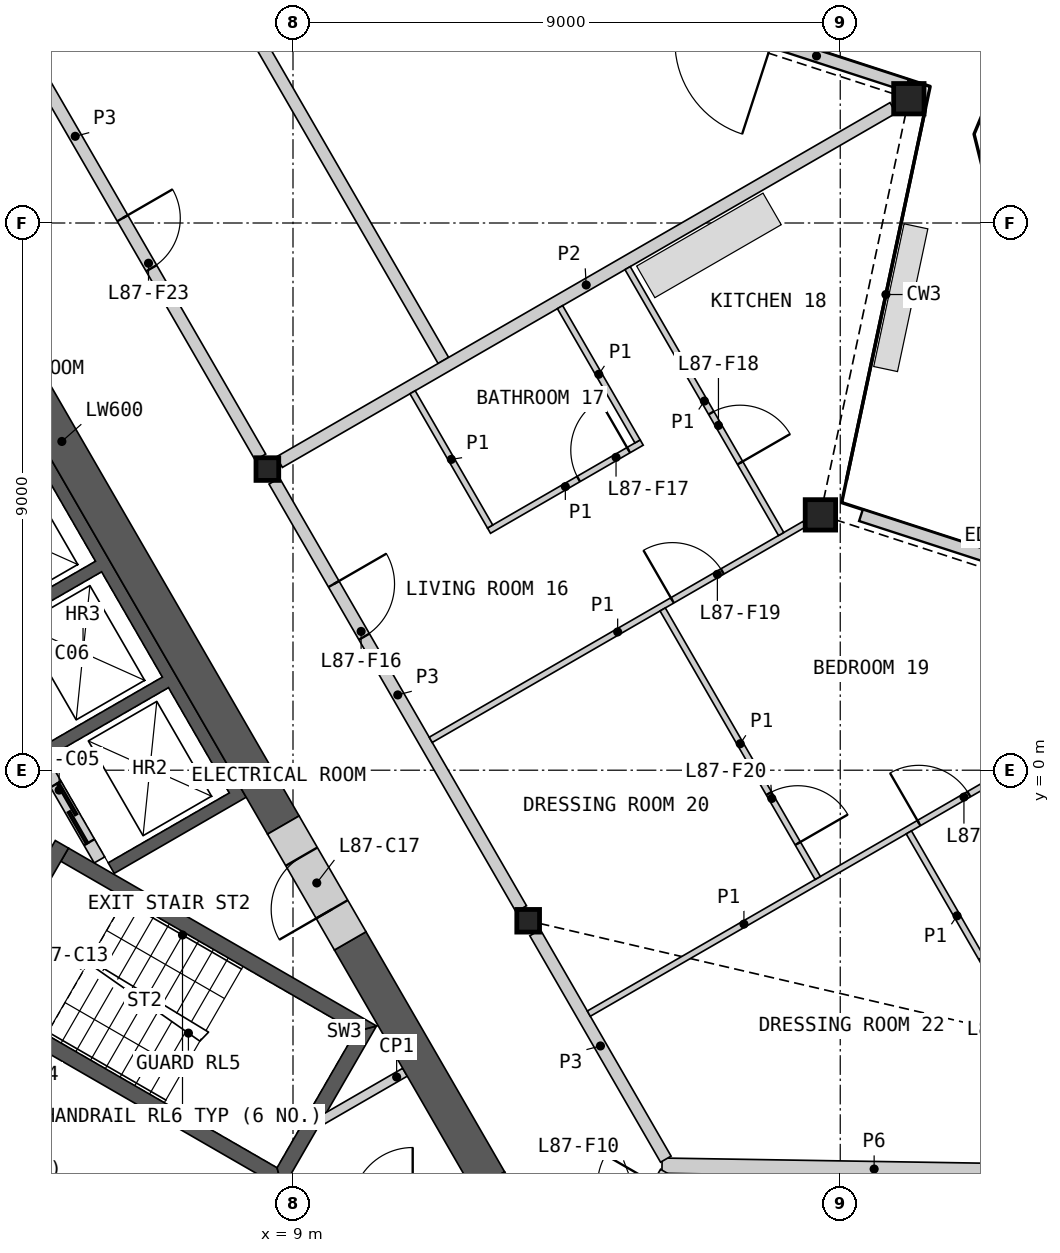
"""IFC4 building model, lengths in metres.
Left out: names, types, materials, properties, quantities, classifications, styles, units other than length and angle.
Written with IfcOpenShell. Run it as: python <this file> out.ifc"""

import sys

from ifc_helpers import new_model, si_unit, direction, frame, frame_2d, origin, origin_2d, place, context, subcontext, project, spatial, polyline, rectangle, hollow_rectangle, i_section, outline, extrude, element, fill, save


model = new_model("IFC4")
c1 = context("Model", 3, precision=1e-05, world=origin(), true_north=direction((0.0, 1.0)))
c2 = subcontext(c1, "Body", "Model", "MODEL_VIEW")
j1 = project(units=[si_unit("LENGTHUNIT", "METRE"), si_unit("PLANEANGLEUNIT", "RADIAN")], contexts=[c1])
p1 = place(None, origin())
s1 = spatial("IfcSite", under=j1, at=p1, CompositionType="ELEMENT")
p2 = place(p1, origin())
s2 = spatial("IfcBuilding", under=s1, at=p2, CompositionType="ELEMENT")
p3 = place(p2, frame((0.0, 0.0, 384.8)))
s3 = spatial("IfcBuildingStorey", under=s2, at=p3, CompositionType="ELEMENT", Elevation=384.8)
for number, where, z_axis, x_axis in (
    (1, (17.674, 4.199, 0.0), (0.0, 0.0, 1.0), (1.0, 0.0, 0.0)),
    (2, (19.129, 11.044, 0.0), (0.0, 0.0, 1.0), (1.0, 0.0, 0.0)),
):
    element("IfcColumn", number, at=place(p3, frame(where, z_axis=z_axis, x_axis=x_axis)), inside=s3, PredefinedType="COLUMN", context=c2, shape_type="SweptSolid", body=[
        extrude(hollow_rectangle(XDim=0.5, YDim=0.5, WallThickness=0.03, at=origin_2d()), origin(), (0.0, 0.0, 1.0), 3.4),
    ])
for number, where, z_axis, x_axis in (
    (3, (12.868, -2.476, 0.0), (0.0, 0.0, 1.0), (1.0, 0.0, 0.0)),
    (4, (8.578, 4.953, 0.0), (0.0, 0.0, 1.0), (1.0, 0.0, 0.0)),
):
    element("IfcColumn", number, at=place(p3, frame(where, z_axis=z_axis, x_axis=x_axis)), inside=s3, PredefinedType="COLUMN", context=c2, shape_type="SweptSolid", body=[
        extrude(i_section(OverallWidth=0.374, OverallDepth=0.372, WebThickness=0.016, FlangeThickness=0.026, at=origin_2d()), origin(), (0.0, 0.0, 1.0), 3.4),
    ])
p4 = place(p3, frame((24.3, 2.257, 0.0), z_axis=(0.0, 0.0, 1.0), x_axis=(-0.951060123915, 0.309005891041, 0.0)))
e5 = element("IfcWall", 5, at=p4, inside=s3, PredefinedType="SOLIDWALL", context=c2, shape_type="SweptSolid", body=[
    extrude(rectangle(XDim=6.265, YDim=0.2, at=frame_2d((3.133, 0.0))), origin(), (0.0, 0.0, 1.0), 2.634),
])
p5 = place(p4, frame((2.333, 0.0, 0.0)))
e6 = element("IfcOpeningElement", 6, at=p5, cuts=e5, PredefinedType="OPENING", context=c2, shape_type="SweptSolid", body=[
    extrude(rectangle(XDim=1.6, YDim=2.25, at=frame_2d((0.8, 1.125))), frame((0.0, 0.11, 0.0), z_axis=(0.0, -1.0, 0.0), x_axis=(1.0, 0.0, 0.0)), (0.0, 0.0, 1.0), 0.22),
])
p6 = place(p3, frame((19.099, 11.264, 0.0), z_axis=(0.0, 0.0, 1.0), x_axis=(-0.951056402988, 0.3090173431, 0.0)))
e7 = element("IfcWall", 7, at=p6, inside=s3, PredefinedType="SOLIDWALL", context=c2, shape_type="SweptSolid", body=[
    extrude(rectangle(XDim=6.265, YDim=0.2, at=frame_2d((3.133, 0.0))), origin(), (0.0, 0.0, 1.0), 2.634),
])
p7 = place(p6, frame((2.333, 0.0, 0.0)))
e8 = element("IfcOpeningElement", 8, at=p7, cuts=e7, PredefinedType="OPENING", context=c2, shape_type="SweptSolid", body=[
    extrude(rectangle(XDim=1.6, YDim=2.25, at=frame_2d((0.8, 1.125))), frame((0.0, 0.11, 0.0), z_axis=(0.0, -1.0, 0.0), x_axis=(1.0, 0.0, 0.0)), (0.0, 0.0, 1.0), 0.22),
])
p8 = place(p3, origin())
e9 = element("IfcWall", 9, at=p8, inside=s3, PredefinedType="SHEAR", context=c2, shape_type="SweptSolid", body=[
    extrude(outline(polyline([(1.561, 6.097), (3.731, 7.35), (8.231, -0.444), (6.061, -1.697), (5.96, -1.524), (7.952, -0.374), (6.952, 1.358), (4.96, 0.208), (4.861, 0.381), (6.852, 1.531), (5.852, 3.263), (3.861, 2.113), (3.76, 2.287), (5.752, 3.437), (4.752, 5.169), (2.76, 4.019), (2.66, 4.192), (4.652, 5.342), (3.652, 7.074), (1.66, 5.924), (1.561, 6.097)])), origin(), (0.0, 0.0, 1.0), 3.1),
])
p9 = place(p3, frame((5.817, -1.476, 0.0), z_axis=(0.0, 0.0, 1.0), x_axis=(-0.500002616675, 0.866023893041, 0.0)))
e10 = element("IfcWall", 10, at=p9, inside=s3, PredefinedType="SOLIDWALL", context=c2, shape_type="SweptSolid", body=[
    extrude(rectangle(XDim=8.373, YDim=0.2, at=frame_2d((4.187, 0.0))), origin(), (0.0, 0.0, 1.0), 3.1),
])
p10 = place(p9, frame((0.337, 0.0, 0.0)))
e11 = element("IfcOpeningElement", 11, at=p10, cuts=e10, PredefinedType="OPENING", context=c2, shape_type="SweptSolid", body=[
    extrude(rectangle(XDim=1.1, YDim=2.1, at=frame_2d((0.55, 1.05))), frame((0.0, 0.11, 0.0), z_axis=(0.0, -1.0, 0.0), x_axis=(1.0, 0.0, 0.0)), (0.0, 0.0, 1.0), 0.22),
])
p11 = place(p9, frame((2.537, 0.0, 0.0)))
e12 = element("IfcOpeningElement", 12, at=p11, cuts=e10, PredefinedType="OPENING", context=c2, shape_type="SweptSolid", body=[
    extrude(rectangle(XDim=1.1, YDim=2.1, at=frame_2d((0.55, 1.05))), frame((0.0, 0.11, 0.0), z_axis=(0.0, -1.0, 0.0), x_axis=(1.0, 0.0, 0.0)), (0.0, 0.0, 1.0), 0.22),
])
p12 = place(p9, frame((4.737, 0.0, 0.0)))
e13 = element("IfcOpeningElement", 13, at=p12, cuts=e10, PredefinedType="OPENING", context=c2, shape_type="SweptSolid", body=[
    extrude(rectangle(XDim=1.1, YDim=2.1, at=frame_2d((0.55, 1.05))), frame((0.0, 0.11, 0.0), z_axis=(0.0, -1.0, 0.0), x_axis=(1.0, 0.0, 0.0)), (0.0, 0.0, 1.0), 0.22),
])
p13 = place(p9, frame((7.037, 0.0, 0.0)))
e14 = element("IfcOpeningElement", 14, at=p13, cuts=e10, PredefinedType="OPENING", context=c2, shape_type="SweptSolid", body=[
    extrude(rectangle(XDim=0.9, YDim=2.1, at=frame_2d((0.45, 1.05))), frame((0.0, 0.11, 0.0), z_axis=(0.0, -1.0, 0.0), x_axis=(1.0, 0.0, 0.0)), (0.0, 0.0, 1.0), 0.22),
])
p14 = place(p3, origin())
e15 = element("IfcWall", 15, at=p14, inside=s3, PredefinedType="SHEAR", context=c2, shape_type="SweptSolid", body=[
    extrude(outline(polyline([(3.763, -3.956), (8.83, -6.881), (8.738, -6.539), (3.888, -3.739), (3.763, -3.956)])), origin(), (0.0, 0.0, 1.0), 3.1),
])
p15 = place(p3, origin())
e16 = element("IfcWall", 16, at=p15, inside=s3, PredefinedType="SHEAR", context=c2, shape_type="SweptSolid", body=[
    extrude(outline(polyline([(8.83, -6.881), (10.374, -4.206), (10.032, -4.298), (8.738, -6.539), (8.83, -6.881)])), origin(), (0.0, 0.0, 1.0), 3.1),
])
p16 = place(p3, origin())
e17 = element("IfcWall", 17, at=p16, inside=s3, PredefinedType="SHEAR", context=c2, shape_type="SweptSolid", body=[
    extrude(outline(polyline([(10.032, -4.298), (10.374, -4.206), (5.307, -1.281), (5.182, -1.498), (10.032, -4.298)])), origin(), (0.0, 0.0, 1.0), 3.1),
])
p17 = place(p3, frame((3.655, -3.893, 0.0), z_axis=(0.0, 0.0, 1.0), x_axis=(0.499982516597, 0.866035497597, 0.0)))
e18 = element("IfcWall", 18, at=p17, inside=s3, PredefinedType="SHEAR", context=c2, shape_type="SweptSolid", body=[
    extrude(rectangle(XDim=3.088, YDim=0.25, at=frame_2d((1.544, 0.0))), origin(), (0.0, 0.0, 1.0), 3.1),
])
p18 = place(p17, frame((0.994, 0.0, 0.0)))
e19 = element("IfcOpeningElement", 19, at=p18, cuts=e18, PredefinedType="OPENING", context=c2, shape_type="SweptSolid", body=[
    extrude(rectangle(XDim=1.1, YDim=2.1, at=frame_2d((0.55, 1.05))), frame((0.0, 0.135, 0.0), z_axis=(0.0, -1.0, 0.0), x_axis=(1.0, 0.0, 0.0)), (0.0, 0.0, 1.0), 0.27),
])
p19 = place(p3, frame((10.842, -4.967, 0.0), z_axis=(0.0, 0.0, 1.0), x_axis=(-0.866098216386, -0.499873863663, 0.0)))
e20 = element("IfcWall", 20, at=p19, inside=s3, PredefinedType="PARTITIONING", context=c2, shape_type="SweptSolid", body=[
    extrude(rectangle(XDim=1.582, YDim=0.15, at=frame_2d((0.791, 0.0))), origin(), (0.0, 0.0, 1.0), 3.1),
])
p20 = place(p3, frame((8.841, -0.902, 0.0), z_axis=(0.0, 0.0, 1.0), x_axis=(-0.499995618375, 0.866027933502, 0.0)))
e21 = element("IfcWall", 21, at=p20, inside=s3, PredefinedType="SHEAR", context=c2, shape_type="SweptSolid", body=[
    extrude(rectangle(XDim=14.571, YDim=0.6, at=frame_2d((7.285, 0.0))), origin(), (0.0, 0.0, 1.0), 3.1),
])
p21 = place(p3, frame((12.221, -6.756, 0.0), z_axis=(0.0, 0.0, 1.0), x_axis=(-0.500020646047, 0.866013483456, 0.0)))
e22 = element("IfcWall", 22, at=p21, inside=s3, PredefinedType="SHEAR", context=c2, shape_type="SweptSolid", body=[
    extrude(rectangle(XDim=4.559, YDim=0.6, at=frame_2d((2.28, 0.0))), origin(), (0.0, 0.0, 1.0), 3.1),
])
p22 = place(p3, origin())
e23 = element("IfcWall", 23, at=p22, inside=s3, PredefinedType="SHEAR", context=c2, shape_type="SweptSolid", body=[
    extrude(outline(polyline([(11.961, -7.506), (11.961, -6.906), (12.48, -6.606), (13.0, -7.506), (11.961, -7.506)])), origin(), (0.0, 0.0, 1.0), 3.1),
])
p23 = place(p3, frame((9.941, -2.807, 0.0), z_axis=(0.0, 0.0, 1.0), x_axis=(-0.499994660107, 0.866028486751, 0.0)))
e24 = element("IfcWall", 24, at=p23, inside=s3, PredefinedType="SHEAR", context=c2, shape_type="SweptSolid", body=[
    extrude(rectangle(XDim=2.2, YDim=0.6, at=frame_2d((1.1, 0.0))), origin(), (0.0, 0.0, 1.0), 3.1),
])
p24 = place(p23, frame((0.6, 0.0, 0.0)))
e25 = element("IfcOpeningElement", 25, at=p24, cuts=e24, PredefinedType="OPENING", context=c2, shape_type="SweptSolid", body=[
    extrude(rectangle(XDim=1.0, YDim=2.1, at=frame_2d((0.5, 1.05))), frame((0.0, 0.31, 0.0), z_axis=(0.0, -1.0, 0.0), x_axis=(1.0, 0.0, 0.0)), (0.0, 0.0, 1.0), 0.62),
])
p25 = place(p3, frame((15.069, -6.503, 0.0), z_axis=(0.0, 0.0, 1.0), x_axis=(0.999870484296, -0.016093931549, 0.0)))
e26 = element("IfcWall", 26, at=p25, inside=s3, PredefinedType="PARTITIONING", context=c2, shape_type="SweptSolid", body=[
    extrude(rectangle(XDim=13.956, YDim=0.25, at=frame_2d((6.978, 0.0))), origin(), (0.0, 0.0, 1.0), 2.33),
])
p26 = place(p3, frame((4.403, 12.185, 0.0), z_axis=(0.0, 0.0, 1.0), x_axis=(0.499992155518, -0.866029932751, 0.0)))
e27 = element("IfcWall", 27, at=p26, inside=s3, PredefinedType="PARTITIONING", context=c2, shape_type="SweptSolid", body=[
    extrude(rectangle(XDim=8.123, YDim=0.2, at=frame_2d((4.062, 0.0))), origin(), (0.0, 0.0, 1.0), 3.1),
])
p27 = place(p26, frame((3.587, 0.0, 0.0)))
e28 = element("IfcOpeningElement", 28, at=p27, cuts=e27, PredefinedType="OPENING", context=c2, shape_type="SweptSolid", body=[
    extrude(rectangle(XDim=0.95, YDim=2.1, at=frame_2d((0.475, 1.05))), frame((0.0, 0.11, 0.0), z_axis=(0.0, -1.0, 0.0), x_axis=(1.0, 0.0, 0.0)), (0.0, 0.0, 1.0), 0.22),
])
p28 = place(p3, frame((8.692, 4.756, 0.0), z_axis=(0.0, 0.0, 1.0), x_axis=(0.500001682468, -0.866024432409, 0.0)))
e29 = element("IfcWall", 29, at=p28, inside=s3, PredefinedType="PARTITIONING", context=c2, shape_type="SweptSolid", body=[
    extrude(rectangle(XDim=8.124, YDim=0.2, at=frame_2d((4.062, 0.0))), origin(), (0.0, 0.0, 1.0), 3.1),
])
p29 = place(p28, frame((1.956, 0.0, 0.0)))
e30 = element("IfcOpeningElement", 30, at=p29, cuts=e29, PredefinedType="OPENING", context=c2, shape_type="SweptSolid", body=[
    extrude(rectangle(XDim=1.0, YDim=2.1, at=frame_2d((0.5, 1.05))), frame((0.0, 0.11, 0.0), z_axis=(0.0, -1.0, 0.0), x_axis=(1.0, 0.0, 0.0)), (0.0, 0.0, 1.0), 0.22),
])
p30 = place(p3, frame((12.981, -2.673, 0.0), z_axis=(0.0, 0.0, 1.0), x_axis=(0.499986217557, -0.866033360935, 0.0)))
e31 = element("IfcWall", 31, at=p30, inside=s3, PredefinedType="PARTITIONING", context=c2, shape_type="SweptSolid", body=[
    extrude(rectangle(XDim=4.3, YDim=0.2, at=frame_2d((2.15, 0.0))), origin(), (0.0, 0.0, 1.0), 3.1),
])
p31 = place(p3, frame((13.281, -9.819, 0.0), z_axis=(0.0, 0.0, 1.0), x_axis=(0.499948957823, 0.866054870994, 0.0)))
e32 = element("IfcWall", 32, at=p31, inside=s3, PredefinedType="PARTITIONING", context=c2, shape_type="SweptSolid", body=[
    extrude(rectangle(XDim=3.701, YDim=0.2, at=frame_2d((1.851, 0.0))), origin(), (0.0, 0.0, 1.0), 3.1),
])
p32 = place(p31, frame((2.451, 0.0, 0.0)))
e33 = element("IfcOpeningElement", 33, at=p32, cuts=e32, PredefinedType="OPENING", context=c2, shape_type="SweptSolid", body=[
    extrude(rectangle(XDim=1.0, YDim=2.1, at=frame_2d((0.5, 1.05))), frame((0.0, 0.11, 0.0), z_axis=(0.0, -1.0, 0.0), x_axis=(1.0, 0.0, 0.0)), (0.0, 0.0, 1.0), 0.22),
])
p33 = place(p3, frame((3.926, 19.811, 0.0), z_axis=(0.0, 0.0, 1.0), x_axis=(0.500001082559, -0.866024778768, 0.0)))
e34 = element("IfcWall", 34, at=p33, inside=s3, PredefinedType="PARTITIONING", context=c2, shape_type="SweptSolid", body=[
    extrude(rectangle(XDim=15.094, YDim=0.2, at=frame_2d((7.547, 0.0))), origin(), (0.0, 0.0, 1.0), 2.33),
])
p34 = place(p33, frame((3.761, 0.0, 0.0)))
e35 = element("IfcOpeningElement", 35, at=p34, cuts=e34, PredefinedType="OPENING", context=c2, shape_type="SweptSolid", body=[
    extrude(rectangle(XDim=0.95, YDim=2.1, at=frame_2d((0.475, 1.05))), frame((0.0, 0.11, 0.0), z_axis=(0.0, -1.0, 0.0), x_axis=(1.0, 0.0, 0.0)), (0.0, 0.0, 1.0), 0.22),
])
p35 = place(p3, frame((8.775, 5.066, 0.0), z_axis=(0.0, 0.0, 1.0), x_axis=(0.866023724155, 0.500002909193, 0.0)))
e36 = element("IfcWall", 36, at=p35, inside=s3, PredefinedType="PARTITIONING", context=c2, shape_type="SweptSolid", body=[
    extrude(rectangle(XDim=11.655, YDim=0.2, at=frame_2d((5.827, 0.0))), origin(), (0.0, 0.0, 1.0), 2.33),
])
p36 = place(p3, frame((13.865, -4.004, 0.0), z_axis=(0.0, 0.0, 1.0), x_axis=(0.866023404247, 0.500003463284, 0.0)))
e37 = element("IfcWall", 37, at=p36, inside=s3, PredefinedType="PARTITIONING", context=c2, shape_type="SweptSolid", body=[
    extrude(rectangle(XDim=11.782, YDim=0.1, at=frame_2d((5.891, 0.0))), origin(), (0.0, 0.0, 1.0), 2.33),
])
p37 = place(p36, frame((6.269, 0.0, 0.0)))
e38 = element("IfcOpeningElement", 38, at=p37, cuts=e37, PredefinedType="OPENING", context=c2, shape_type="SweptSolid", body=[
    extrude(rectangle(XDim=0.95, YDim=2.1, at=frame_2d((0.475, 1.05))), frame((0.0, 0.06, 0.0), z_axis=(0.0, -1.0, 0.0), x_axis=(1.0, 0.0, 0.0)), (0.0, 0.0, 1.0), 0.12),
])
p38 = place(p3, frame((11.265, 0.5, 0.0), z_axis=(0.0, 0.0, 1.0), x_axis=(0.866033839264, 0.499985389037, 0.0)))
e39 = element("IfcWall", 39, at=p38, inside=s3, PredefinedType="PARTITIONING", context=c2, shape_type="SweptSolid", body=[
    extrude(rectangle(XDim=7.1, YDim=0.1, at=frame_2d((3.55, 0.0))), origin(), (0.0, 0.0, 1.0), 2.33),
])
p39 = place(p38, frame((4.588, 0.0, 0.0)))
e40 = element("IfcOpeningElement", 40, at=p39, cuts=e39, PredefinedType="OPENING", context=c2, shape_type="SweptSolid", body=[
    extrude(rectangle(XDim=0.95, YDim=2.1, at=frame_2d((0.475, 1.05))), frame((0.0, 0.06, 0.0), z_axis=(0.0, -1.0, 0.0), x_axis=(1.0, 0.0, 0.0)), (0.0, 0.0, 1.0), 0.12),
])
p40 = place(p3, frame((19.128, -1.023, 0.0), z_axis=(0.0, 0.0, 1.0), x_axis=(0.499991387631, -0.866030376081, 0.0)))
e41 = element("IfcWall", 41, at=p40, inside=s3, PredefinedType="PARTITIONING", context=c2, shape_type="SweptSolid", body=[
    extrude(rectangle(XDim=6.339, YDim=0.1, at=frame_2d((3.169, 0.0))), origin(), (0.0, 0.0, 1.0), 2.33),
])
p41 = place(p40, frame((2.389, 0.0, 0.0)))
e42 = element("IfcOpeningElement", 42, at=p41, cuts=e41, PredefinedType="OPENING", context=c2, shape_type="SweptSolid", body=[
    extrude(rectangle(XDim=0.95, YDim=2.1, at=frame_2d((0.475, 1.05))), frame((0.0, 0.06, 0.0), z_axis=(0.0, -1.0, 0.0), x_axis=(1.0, 0.0, 0.0)), (0.0, 0.0, 1.0), 0.12),
])
p42 = place(p3, frame((15.08, 2.644, 0.0), z_axis=(0.0, 0.0, 1.0), x_axis=(0.500005610874, -0.86602216432, 0.0)))
e43 = element("IfcWall", 43, at=p42, inside=s3, PredefinedType="PARTITIONING", context=c2, shape_type="SweptSolid", body=[
    extrude(rectangle(XDim=5.1, YDim=0.1, at=frame_2d((2.55, 0.0))), origin(), (0.0, 0.0, 1.0), 2.33),
])
p43 = place(p42, frame((3.494, 0.0, 0.0)))
e44 = element("IfcOpeningElement", 44, at=p43, cuts=e43, PredefinedType="OPENING", context=c2, shape_type="SweptSolid", body=[
    extrude(rectangle(XDim=0.95, YDim=2.1, at=frame_2d((0.475, 1.05))), frame((0.0, 0.06, 0.0), z_axis=(0.0, -1.0, 0.0), x_axis=(1.0, 0.0, 0.0)), (0.0, 0.0, 1.0), 0.12),
])
p44 = place(p3, frame((14.503, 8.258, 0.0), z_axis=(0.0, 0.0, 1.0), x_axis=(0.500012591307, -0.866018134068, 0.0)))
e45 = element("IfcWall", 45, at=p44, inside=s3, PredefinedType="PARTITIONING", context=c2, shape_type="SweptSolid", body=[
    extrude(rectangle(XDim=5.05, YDim=0.1, at=frame_2d((2.525, 0.0))), origin(), (0.0, 0.0, 1.0), 2.33),
])
p45 = place(p44, frame((2.75, 0.0, 0.0)))
e46 = element("IfcOpeningElement", 46, at=p45, cuts=e45, PredefinedType="OPENING", context=c2, shape_type="SweptSolid", body=[
    extrude(rectangle(XDim=0.95, YDim=2.1, at=frame_2d((0.475, 1.05))), frame((0.0, 0.06, 0.0), z_axis=(0.0, -1.0, 0.0), x_axis=(1.0, 0.0, 0.0)), (0.0, 0.0, 1.0), 0.12),
])
p46 = place(p3, frame((12.223, 3.939, 0.0), z_axis=(0.0, 0.0, 1.0), x_axis=(0.866032775405, 0.499987231761, 0.0)))
e47 = element("IfcWall", 47, at=p46, inside=s3, PredefinedType="PARTITIONING", context=c2, shape_type="SweptSolid", body=[
    extrude(rectangle(XDim=2.9, YDim=0.1, at=frame_2d((1.45, 0.0))), origin(), (0.0, 0.0, 1.0), 2.33),
])
p47 = place(p46, frame((1.7, 0.0, 0.0)))
e48 = element("IfcOpeningElement", 48, at=p47, cuts=e47, PredefinedType="OPENING", context=c2, shape_type="SweptSolid", body=[
    extrude(rectangle(XDim=0.95, YDim=2.1, at=frame_2d((0.475, 1.05))), frame((0.0, 0.06, 0.0), z_axis=(0.0, -1.0, 0.0), x_axis=(1.0, 0.0, 0.0)), (0.0, 0.0, 1.0), 0.12),
])
for number, where, z_axis, x_axis in (
    (49, (10.967, 6.216, 0.0), (0.0, 0.0, 1.0), (0.5, -0.866, 0.0)),
    (50, (13.392, 7.616, 0.0), (0.0, 0.0, 1.0), (0.5, -0.866, 0.0)),
):
    element("IfcWall", number, at=place(p3, frame(where, z_axis=z_axis, x_axis=x_axis)), inside=s3, PredefinedType="PARTITIONING", context=c2, shape_type="SweptSolid", body=[
        extrude(rectangle(XDim=2.55, YDim=0.1, at=frame_2d((1.275, 0.0))), origin(), (0.0, 0.0, 1.0), 2.33),
    ])
p48 = place(p10, origin())
e51 = element("IfcDoor", 51, at=p48, inside=s3, OperationType="SLIDING_TO_LEFT", PredefinedType="DOOR", context=c2, shape_type="SweptSolid", body=[
    extrude(rectangle(XDim=1.1, YDim=2.1, at=frame_2d((0.55, 1.05))), frame((0.0, 0.025, 0.0), z_axis=(0.0, -1.0, 0.0), x_axis=(1.0, 0.0, 0.0)), (0.0, 0.0, 1.0), 0.05),
])
fill(e11, e51)
p49 = place(p24, origin())
e52 = element("IfcDoor", 52, at=p49, inside=s3, OperationType="SINGLE_SWING_LEFT", PredefinedType="DOOR", context=c2, shape_type="SweptSolid", body=[
    extrude(rectangle(XDim=1.0, YDim=2.1, at=frame_2d((0.5, 1.05))), frame((0.0, 0.055, 0.0), z_axis=(0.0, -1.0, 0.0), x_axis=(1.0, 0.0, 0.0)), (0.0, 0.0, 1.0), 0.05),
])
fill(e25, e52)
p50 = place(p29, origin())
e53 = element("IfcDoor", 53, at=p50, inside=s3, OperationType="SINGLE_SWING_LEFT", PredefinedType="DOOR", context=c2, shape_type="SweptSolid", body=[
    extrude(rectangle(XDim=1.0, YDim=2.1, at=frame_2d((0.5, 1.05))), frame((0.0, 0.025, 0.0), z_axis=(0.0, -1.0, 0.0), x_axis=(1.0, 0.0, 0.0)), (0.0, 0.0, 1.0), 0.05),
])
fill(e30, e53)
p51 = place(p47, origin())
e54 = element("IfcDoor", 54, at=p51, inside=s3, OperationType="SINGLE_SWING_RIGHT", PredefinedType="DOOR", context=c2, shape_type="SweptSolid", body=[
    extrude(rectangle(XDim=0.95, YDim=2.1, at=frame_2d((0.475, 1.05))), frame((0.0, 0.025, 0.0), z_axis=(0.0, -1.0, 0.0), x_axis=(1.0, 0.0, 0.0)), (0.0, 0.0, 1.0), 0.05),
])
fill(e48, e54)
p52 = place(p45, origin())
e55 = element("IfcDoor", 55, at=p52, inside=s3, OperationType="SINGLE_SWING_RIGHT", PredefinedType="DOOR", context=c2, shape_type="SweptSolid", body=[
    extrude(rectangle(XDim=0.95, YDim=2.1, at=frame_2d((0.475, 1.05))), frame((0.0, 0.025, 0.0), z_axis=(0.0, -1.0, 0.0), x_axis=(1.0, 0.0, 0.0)), (0.0, 0.0, 1.0), 0.05),
])
fill(e46, e55)
p53 = place(p39, origin())
e56 = element("IfcDoor", 56, at=p53, inside=s3, OperationType="SINGLE_SWING_LEFT", PredefinedType="DOOR", context=c2, shape_type="SweptSolid", body=[
    extrude(rectangle(XDim=0.95, YDim=2.1, at=frame_2d((0.475, 1.05))), frame((0.0, 0.025, 0.0), z_axis=(0.0, -1.0, 0.0), x_axis=(1.0, 0.0, 0.0)), (0.0, 0.0, 1.0), 0.05),
])
fill(e40, e56)
p54 = place(p43, origin())
e57 = element("IfcDoor", 57, at=p54, inside=s3, OperationType="SINGLE_SWING_RIGHT", PredefinedType="DOOR", context=c2, shape_type="SweptSolid", body=[
    extrude(rectangle(XDim=0.95, YDim=2.1, at=frame_2d((0.475, 1.05))), frame((0.0, 0.025, 0.0), z_axis=(0.0, -1.0, 0.0), x_axis=(1.0, 0.0, 0.0)), (0.0, 0.0, 1.0), 0.05),
])
fill(e44, e57)
p55 = place(p37, origin())
e58 = element("IfcDoor", 58, at=p55, inside=s3, OperationType="SINGLE_SWING_LEFT", PredefinedType="DOOR", context=c2, shape_type="SweptSolid", body=[
    extrude(rectangle(XDim=0.95, YDim=2.1, at=frame_2d((0.475, 1.05))), frame((0.0, 0.025, 0.0), z_axis=(0.0, -1.0, 0.0), x_axis=(1.0, 0.0, 0.0)), (0.0, 0.0, 1.0), 0.05),
])
fill(e38, e58)
p56 = place(p41, origin())
e59 = element("IfcDoor", 59, at=p56, inside=s3, OperationType="SINGLE_SWING_LEFT", PredefinedType="DOOR", context=c2, shape_type="SweptSolid", body=[
    extrude(rectangle(XDim=0.95, YDim=2.1, at=frame_2d((0.475, 1.05))), frame((0.0, 0.025, 0.0), z_axis=(0.0, -1.0, 0.0), x_axis=(1.0, 0.0, 0.0)), (0.0, 0.0, 1.0), 0.05),
])
fill(e42, e59)
p57 = place(p27, origin())
e60 = element("IfcDoor", 60, at=p57, inside=s3, OperationType="SINGLE_SWING_LEFT", PredefinedType="DOOR", context=c2, shape_type="SweptSolid", body=[
    extrude(rectangle(XDim=0.95, YDim=2.1, at=frame_2d((0.475, 1.05))), frame((0.0, 0.025, 0.0), z_axis=(0.0, -1.0, 0.0), x_axis=(1.0, 0.0, 0.0)), (0.0, 0.0, 1.0), 0.05),
])
fill(e28, e60)
save(model, sys.argv[1])
